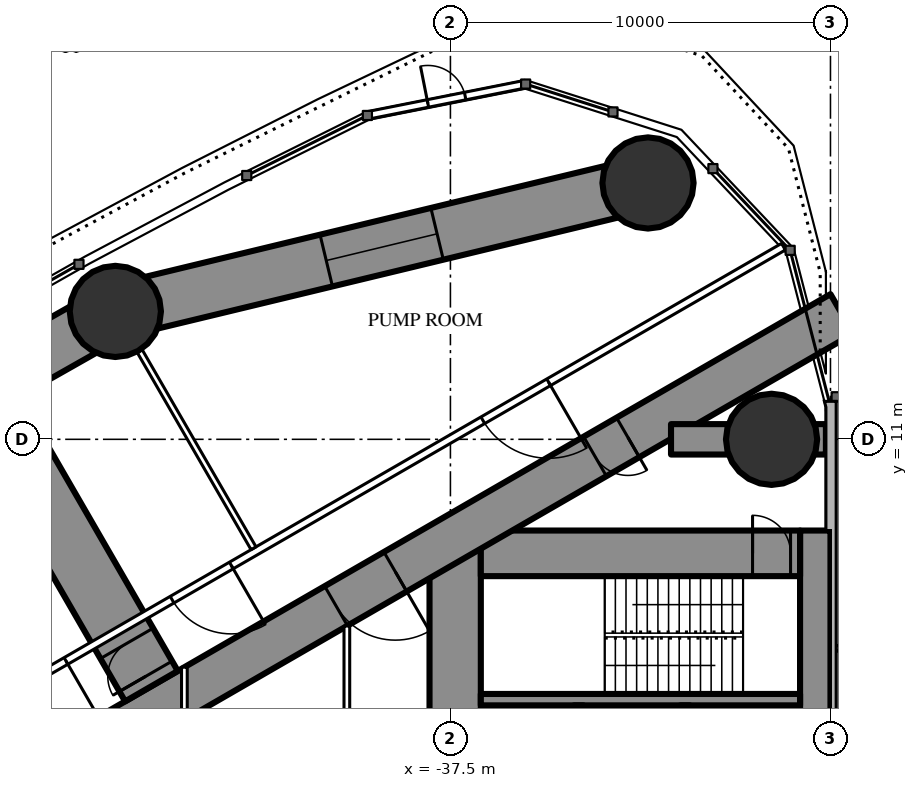
"""IFC4 building model, lengths in metres.
Left out: names, types, materials, properties, quantities, classifications, styles, units other than length and angle.
Written with IfcOpenShell. Run it as: python <this file> out.ifc"""

import sys

from ifc_helpers import new_model, si_unit, direction, frame, frame_2d, origin, origin_2d, place, context, subcontext, project, spatial, rectangle, circle, hollow_circle, extrude, element, fill, save


model = new_model("IFC4")
c1 = context("Model", 3, precision=1e-05, world=origin(), true_north=direction((0.0, 1.0)))
c2 = subcontext(c1, "Body", "Model", "MODEL_VIEW")
j1 = project(units=[si_unit("LENGTHUNIT", "METRE"), si_unit("PLANEANGLEUNIT", "RADIAN")], contexts=[c1])
p1 = place(None, origin())
s1 = spatial("IfcSite", under=j1, at=p1, CompositionType="ELEMENT")
p2 = place(p1, origin())
s2 = spatial("IfcBuilding", under=s1, at=p2, CompositionType="ELEMENT")
p3 = place(p2, frame((0.0, 0.0, 210.3)))
s3 = spatial("IfcBuildingStorey", under=s2, at=p3, CompositionType="ELEMENT", Elevation=210.3)
p4 = place(p3, frame((-32.301, 17.745, 0.0), z_axis=(0.0, 0.0, 1.0), x_axis=(1.0, 0.0, 0.0)))
e1 = element("IfcColumn", 1, at=p4, inside=s3, PredefinedType="COLUMN", context=c2, shape_type="SweptSolid", body=[
    extrude(circle(Radius=1.2, at=origin_2d()), origin(), (0.0, 0.0, 1.0), 5.0),
])
p5 = place(p3, frame((-29.05, 11.0, 0.0), z_axis=(0.0, 0.0, 1.0), x_axis=(1.0, 0.0, 0.0)))
e2 = element("IfcColumn", 2, at=p5, inside=s3, PredefinedType="COLUMN", context=c2, shape_type="SweptSolid", body=[
    extrude(hollow_circle(Radius=1.2, WallThickness=0.09, at=origin_2d()), origin(), (0.0, 0.0, 1.0), 5.0),
])
p6 = place(p3, frame((-46.317, 14.365, 0.0), z_axis=(0.0, 0.0, 1.0), x_axis=(1.0, 0.0, 0.0)))
e3 = element("IfcColumn", 3, at=p6, inside=s3, PredefinedType="COLUMN", context=c2, shape_type="SweptSolid", body=[
    extrude(circle(Radius=1.2, at=origin_2d()), origin(), (0.0, 0.0, 1.0), 5.0),
])
p7 = place(p3, frame((-27.9, 8.6, 0.0), z_axis=(0.0, 0.0, 1.0), x_axis=(0.0, -1.0, 0.0)))
e4 = element("IfcWall", 4, at=p7, inside=s3, PredefinedType="SHEAR", context=c2, shape_type="SweptSolid", body=[
    extrude(rectangle(XDim=17.2, YDim=0.8, at=frame_2d((8.6, 0.0))), origin(), (0.0, 0.0, 1.0), 5.0),
])
p8 = place(p7, frame((6.95, 0.0, 0.0)))
e5 = element("IfcOpeningElement", 5, at=p8, cuts=e4, PredefinedType="OPENING", context=c2, shape_type="SweptSolid", body=[
    extrude(rectangle(XDim=0.9, YDim=2.2, at=frame_2d((0.45, 1.1))), frame((0.0, 0.41, 0.0), z_axis=(0.0, -1.0, 0.0), x_axis=(1.0, 0.0, 0.0)), (0.0, 0.0, 1.0), 0.82),
])
p9 = place(p3, frame((-37.375, 8.6, 0.0), z_axis=(0.0, 0.0, 1.0), x_axis=(0.0, -1.0, 0.0)))
e6 = element("IfcWall", 6, at=p9, inside=s3, PredefinedType="SHEAR", context=c2, shape_type="SweptSolid", body=[
    extrude(rectangle(XDim=17.2, YDim=1.35, at=frame_2d((8.6, 0.0))), origin(), (0.0, 0.0, 1.0), 5.0),
])
p10 = place(p9, frame((7.7, 0.0, 0.0)))
e7 = element("IfcOpeningElement", 7, at=p10, cuts=e6, PredefinedType="OPENING", context=c2, shape_type="SweptSolid", body=[
    extrude(rectangle(XDim=1.8, YDim=2.2, at=frame_2d((0.9, 1.1))), frame((0.0, 0.685, 0.0), z_axis=(0.0, -1.0, 0.0), x_axis=(1.0, 0.0, 0.0)), (0.0, 0.0, 1.0), 1.37),
])
p11 = place(p3, frame((-28.3, 8.0, 0.0), z_axis=(0.0, 0.0, 1.0), x_axis=(-1.0, 0.0, 0.0)))
e8 = element("IfcWall", 8, at=p11, inside=s3, PredefinedType="SHEAR", context=c2, shape_type="SweptSolid", body=[
    extrude(rectangle(XDim=8.4, YDim=1.2, at=frame_2d((4.2, 0.0))), origin(), (0.0, 0.0, 1.0), 5.0),
])
p12 = place(p11, frame((0.25, 0.0, 0.0)))
e9 = element("IfcOpeningElement", 9, at=p12, cuts=e8, PredefinedType="OPENING", context=c2, shape_type="SweptSolid", body=[
    extrude(rectangle(XDim=1.0, YDim=2.2, at=frame_2d((0.5, 1.1))), frame((0.0, 0.61, 0.0), z_axis=(0.0, -1.0, 0.0), x_axis=(1.0, 0.0, 0.0)), (0.0, 0.0, 1.0), 1.22),
])
p13 = place(p3, frame((-28.3, 4.15, 0.0), z_axis=(0.0, 0.0, 1.0), x_axis=(-1.0, 0.0, 0.0)))
e10 = element("IfcWall", 10, at=p13, inside=s3, PredefinedType="SHEAR", context=c2, shape_type="SweptSolid", body=[
    extrude(rectangle(XDim=8.4, YDim=0.3, at=frame_2d((4.2, 0.0))), origin(), (0.0, 0.0, 1.0), 5.0),
])
p14 = place(p3, frame((-31.325, 4.0, 0.0), z_axis=(0.0, 0.0, 1.0), x_axis=(0.0, -1.0, 0.0)))
e11 = element("IfcWall", 11, at=p14, inside=s3, PredefinedType="SHEAR", context=c2, shape_type="SweptSolid", body=[
    extrude(rectangle(XDim=2.1, YDim=0.25, at=frame_2d((1.05, 0.0))), origin(), (0.0, 0.0, 1.0), 5.0),
])
p15 = place(p14, frame((0.5, 0.0, 0.0)))
e12 = element("IfcOpeningElement", 12, at=p15, cuts=e11, PredefinedType="OPENING", context=c2, shape_type="SweptSolid", body=[
    extrude(rectangle(XDim=1.1, YDim=2.2, at=frame_2d((0.55, 1.1))), frame((0.0, 0.135, 0.0), z_axis=(0.0, -1.0, 0.0), x_axis=(1.0, 0.0, 0.0)), (0.0, 0.0, 1.0), 0.27),
])
p16 = place(p3, frame((-34.125, 4.0, 0.0), z_axis=(0.0, 0.0, 1.0), x_axis=(0.0, -1.0, 0.0)))
e13 = element("IfcWall", 13, at=p16, inside=s3, PredefinedType="SHEAR", context=c2, shape_type="SweptSolid", body=[
    extrude(rectangle(XDim=2.35, YDim=0.25, at=frame_2d((1.175, 0.0))), origin(), (0.0, 0.0, 1.0), 5.0),
])
p17 = place(p3, frame((-27.2, 14.3, 0.0), z_axis=(0.0, 0.0, 1.0), x_axis=(-0.866026593062, -0.499997940104, 0.0)))
e14 = element("IfcWall", 14, at=p17, inside=s3, PredefinedType="SHEAR", context=c2, shape_type="SweptSolid", body=[
    extrude(rectangle(XDim=28.946, YDim=1.2, at=frame_2d((14.473, 0.0))), origin(), (0.0, 0.0, 1.0), 5.0),
])
p18 = place(p17, frame((6.5, 0.0, 0.0)))
e15 = element("IfcOpeningElement", 15, at=p18, cuts=e14, PredefinedType="OPENING", context=c2, shape_type="SweptSolid", body=[
    extrude(rectangle(XDim=1.0, YDim=2.2, at=frame_2d((0.5, 1.1))), frame((0.0, 0.61, 0.0), z_axis=(0.0, -1.0, 0.0), x_axis=(1.0, 0.0, 0.0)), (0.0, 0.0, 1.0), 1.22),
])
p19 = place(p17, frame((13.568, 0.0, 0.0)))
e16 = element("IfcOpeningElement", 16, at=p19, cuts=e14, PredefinedType="OPENING", context=c2, shape_type="SweptSolid", body=[
    extrude(rectangle(XDim=1.8, YDim=2.2, at=frame_2d((0.9, 1.1))), frame((0.0, 0.61, 0.0), z_axis=(0.0, -1.0, 0.0), x_axis=(1.0, 0.0, 0.0)), (0.0, 0.0, 1.0), 1.22),
])
p20 = place(p3, frame((-27.62, 11.0, 0.0), z_axis=(0.0, 0.0, 1.0), x_axis=(-1.0, 0.0, 0.0)))
e17 = element("IfcWall", 17, at=p20, inside=s3, PredefinedType="SHEAR", context=c2, shape_type="SweptSolid", body=[
    extrude(rectangle(XDim=4.076, YDim=0.8, at=frame_2d((2.038, 0.0))), origin(), (0.0, 0.0, 1.0), 5.0),
])
p21 = place(p3, frame((-45.366, 4.504, 0.0), z_axis=(0.0, 0.0, 1.0), x_axis=(-0.499998848701, 0.866026068486, 0.0)))
e18 = element("IfcWall", 18, at=p21, inside=s3, PredefinedType="SHEAR", context=c2, shape_type="SweptSolid", body=[
    extrude(rectangle(XDim=9.048, YDim=1.6, at=frame_2d((4.524, 0.0))), origin(), (0.0, 0.0, 1.0), 5.0),
])
p22 = place(p21, frame((0.3, 0.0, 0.0)))
e19 = element("IfcOpeningElement", 19, at=p22, cuts=e18, PredefinedType="OPENING", context=c2, shape_type="SweptSolid", body=[
    extrude(rectangle(XDim=1.0, YDim=2.2, at=frame_2d((0.5, 1.1))), frame((0.0, 0.81, 0.0), z_axis=(0.0, -1.0, 0.0), x_axis=(1.0, 0.0, 0.0)), (0.0, 0.0, 1.0), 1.62),
])
p23 = place(p3, frame((-32.301, 17.745, 0.0), z_axis=(0.0, 0.0, 1.0), x_axis=(-0.972132796948, -0.234430853556, 0.0)))
e20 = element("IfcWall", 20, at=p23, inside=s3, PredefinedType="SHEAR", context=c2, shape_type="SweptSolid", body=[
    extrude(rectangle(XDim=14.417, YDim=1.4, at=frame_2d((7.209, 0.0))), origin(), (0.0, 0.0, 1.0), 5.0),
])
p24 = place(p23, frame((5.709, 0.0, 0.6)))
e21 = element("IfcOpeningElement", 21, at=p24, cuts=e20, PredefinedType="OPENING", context=c2, shape_type="SweptSolid", body=[
    extrude(rectangle(XDim=3.0, YDim=1.2, at=frame_2d((1.5, 0.6))), frame((0.0, 0.71, 0.0), z_axis=(0.0, -1.0, 0.0), x_axis=(1.0, 0.0, 0.0)), (0.0, 0.0, 1.0), 1.42),
])
p25 = place(p3, frame((-46.317, 14.365, 0.0), z_axis=(0.0, 0.0, 1.0), x_axis=(-0.869978841992, -0.493089053301, 0.0)))
e22 = element("IfcWall", 22, at=p25, inside=s3, PredefinedType="SHEAR", context=c2, shape_type="SweptSolid", body=[
    extrude(rectangle(XDim=4.108, YDim=1.4, at=frame_2d((2.054, 0.0))), origin(), (0.0, 0.0, 1.0), 5.0),
])
p26 = place(p3, frame((-39.685, 19.521, 0.0), z_axis=(0.0, 0.0, 1.0), x_axis=(0.980858378754, 0.194722471298, 0.0)))
e23 = element("IfcWall", 23, at=p26, inside=s3, PredefinedType="STANDARD", context=c2, shape_type="SweptSolid", body=[
    extrude(rectangle(XDim=4.245, YDim=0.2, at=frame_2d((2.123, 0.0))), origin(), (0.0, 0.0, 1.0), 4.75),
])
p27 = place(p26, frame((1.623, 0.0, 0.0)))
e24 = element("IfcOpeningElement", 24, at=p27, cuts=e23, PredefinedType="OPENING", context=c2, shape_type="SweptSolid", body=[
    extrude(rectangle(XDim=1.0, YDim=2.2, at=frame_2d((0.5, 1.1))), frame((0.0, 0.11, 0.0), z_axis=(0.0, -1.0, 0.0), x_axis=(1.0, 0.0, 0.0)), (0.0, 0.0, 1.0), 0.22),
])
p28 = place(p3, frame((-28.737, 16.068, 0.0), z_axis=(0.0, 0.0, 1.0), x_axis=(-0.866026057212, -0.499998868229, 0.0)))
e25 = element("IfcWall", 25, at=p28, inside=s3, PredefinedType="PARTITIONING", context=c2, shape_type="SweptSolid", body=[
    extrude(rectangle(XDim=32.137, YDim=0.2, at=frame_2d((16.068, 0.0))), origin(), (0.0, 0.0, 1.0), 4.75),
])
p29 = place(p28, frame((7.134, 0.0, 0.0)))
e26 = element("IfcOpeningElement", 26, at=p29, cuts=e25, PredefinedType="OPENING", context=c2, shape_type="SweptSolid", body=[
    extrude(rectangle(XDim=2.0, YDim=2.4, at=frame_2d((1.0, 1.2))), frame((0.0, 0.11, 0.0), z_axis=(0.0, -1.0, 0.0), x_axis=(1.0, 0.0, 0.0)), (0.0, 0.0, 1.0), 0.22),
])
p30 = place(p28, frame((16.776, 0.0, 0.0)))
e27 = element("IfcOpeningElement", 27, at=p30, cuts=e25, PredefinedType="OPENING", context=c2, shape_type="SweptSolid", body=[
    extrude(rectangle(XDim=1.8, YDim=2.2, at=frame_2d((0.9, 1.1))), frame((0.0, 0.11, 0.0), z_axis=(0.0, -1.0, 0.0), x_axis=(1.0, 0.0, 0.0)), (0.0, 0.0, 1.0), 0.22),
])
p31 = place(p28, frame((21.799, 0.0, 0.0)))
e28 = element("IfcOpeningElement", 28, at=p31, cuts=e25, PredefinedType="OPENING", context=c2, shape_type="SweptSolid", body=[
    extrude(rectangle(XDim=1.8, YDim=2.2, at=frame_2d((0.9, 1.1))), frame((0.0, 0.11, 0.0), z_axis=(0.0, -1.0, 0.0), x_axis=(1.0, 0.0, 0.0)), (0.0, 0.0, 1.0), 0.22),
])
p32 = place(p28, frame((26.575, 0.0, 0.0)))
e29 = element("IfcOpeningElement", 29, at=p32, cuts=e25, PredefinedType="OPENING", context=c2, shape_type="SweptSolid", body=[
    extrude(rectangle(XDim=1.8, YDim=2.2, at=frame_2d((0.9, 1.1))), frame((0.0, 0.11, 0.0), z_axis=(0.0, -1.0, 0.0), x_axis=(1.0, 0.0, 0.0)), (0.0, 0.0, 1.0), 0.22),
])
p33 = place(p3, frame((-42.68, 8.134, 0.0), z_axis=(0.0, 0.0, 1.0), x_axis=(-0.499984479505, 0.866034364361, 0.0)))
e30 = element("IfcWall", 30, at=p33, inside=s3, PredefinedType="PARTITIONING", context=c2, shape_type="SweptSolid", body=[
    extrude(rectangle(XDim=5.995, YDim=0.15, at=frame_2d((2.998, 0.0))), origin(), (0.0, 0.0, 1.0), 3.85),
])
p34 = place(p3, frame((-40.225, 6.087, 0.0), z_axis=(0.0, 0.0, 1.0), x_axis=(0.0, -1.0, 0.0)))
e31 = element("IfcWall", 31, at=p34, inside=s3, PredefinedType="PARTITIONING", context=c2, shape_type="SweptSolid", body=[
    extrude(rectangle(XDim=12.174, YDim=0.15, at=frame_2d((6.087, 0.0))), origin(), (0.0, 0.0, 1.0), 4.75),
])
p35 = place(p34, frame((5.187, 0.0, 0.0)))
e32 = element("IfcOpeningElement", 32, at=p35, cuts=e31, PredefinedType="OPENING", context=c2, shape_type="SweptSolid", body=[
    extrude(rectangle(XDim=1.8, YDim=2.2, at=frame_2d((0.9, 1.1))), frame((0.0, 0.085, 0.0), z_axis=(0.0, -1.0, 0.0), x_axis=(1.0, 0.0, 0.0)), (0.0, 0.0, 1.0), 0.17),
])
p36 = place(p3, frame((-44.5, 5.005, 0.0), z_axis=(0.0, 0.0, 1.0), x_axis=(0.0, -1.0, 0.0)))
e33 = element("IfcWall", 33, at=p36, inside=s3, PredefinedType="PARTITIONING", context=c2, shape_type="SweptSolid", body=[
    extrude(rectangle(XDim=10.009, YDim=0.15, at=frame_2d((5.005, 0.0))), origin(), (0.0, 0.0, 1.0), 4.75),
])
p37 = place(p36, frame((4.505, 0.0, 0.0)))
e34 = element("IfcOpeningElement", 34, at=p37, cuts=e33, PredefinedType="OPENING", context=c2, shape_type="SweptSolid", body=[
    extrude(rectangle(XDim=1.0, YDim=2.2, at=frame_2d((0.5, 1.1))), frame((0.0, 0.085, 0.0), z_axis=(0.0, -1.0, 0.0), x_axis=(1.0, 0.0, 0.0)), (0.0, 0.0, 1.0), 0.17),
])
p38 = place(p3, frame((-27.35, 5.5, 0.0), z_axis=(0.0, 0.0, 1.0), x_axis=(1.0, 0.0, 0.0)))
e35 = element("IfcWall", 35, at=p38, inside=s3, PredefinedType="PARTITIONING", context=c2, shape_type="SweptSolid", body=[
    extrude(rectangle(XDim=0.85, YDim=0.15, at=frame_2d((0.425, 0.0))), origin(), (0.0, 0.0, 1.0), 3.8),
])
p39 = place(p24, origin())
e36 = element("IfcWindow", 36, at=p39, inside=s3, PartitioningType="SINGLE_PANEL", PredefinedType="WINDOW", context=c2, shape_type="SweptSolid", body=[
    extrude(rectangle(XDim=3.0, YDim=1.2, at=frame_2d((1.5, 0.6))), frame((0.0, 0.03, 0.0), z_axis=(0.0, -1.0, 0.0), x_axis=(1.0, 0.0, 0.0)), (0.0, 0.0, 1.0), 0.06),
])
fill(e21, e36)
p40 = place(p27, origin())
e37 = element("IfcDoor", 37, at=p40, inside=s3, OperationType="SINGLE_SWING_LEFT", PredefinedType="DOOR", context=c2, shape_type="SweptSolid", body=[
    extrude(rectangle(XDim=1.0, YDim=2.2, at=frame_2d((0.5, 1.1))), frame((0.0, 0.025, 0.0), z_axis=(0.0, -1.0, 0.0), x_axis=(1.0, 0.0, 0.0)), (0.0, 0.0, 1.0), 0.05),
])
fill(e24, e37)
p41 = place(p22, origin())
e38 = element("IfcDoor", 38, at=p41, inside=s3, OperationType="SINGLE_SWING_LEFT", PredefinedType="DOOR", context=c2, shape_type="SweptSolid", body=[
    extrude(rectangle(XDim=1.0, YDim=2.2, at=frame_2d((0.5, 1.1))), frame((0.0, 0.025, 0.0), z_axis=(0.0, -1.0, 0.0), x_axis=(1.0, 0.0, 0.0)), (0.0, 0.0, 1.0), 0.05),
])
fill(e19, e38)
p42 = place(p29, origin())
e39 = element("IfcDoor", 39, at=p42, inside=s3, OperationType="DOUBLE_DOOR_SINGLE_SWING", PredefinedType="DOOR", context=c2, shape_type="SweptSolid", body=[
    extrude(rectangle(XDim=2.0, YDim=2.4, at=frame_2d((1.0, 1.2))), frame((0.0, 0.025, 0.0), z_axis=(0.0, -1.0, 0.0), x_axis=(1.0, 0.0, 0.0)), (0.0, 0.0, 1.0), 0.05),
])
fill(e26, e39)
p43 = place(p30, origin())
e40 = element("IfcDoor", 40, at=p43, inside=s3, OperationType="DOUBLE_DOOR_SINGLE_SWING", PredefinedType="DOOR", context=c2, shape_type="SweptSolid", body=[
    extrude(rectangle(XDim=1.8, YDim=2.2, at=frame_2d((0.9, 1.1))), frame((0.0, 0.025, 0.0), z_axis=(0.0, -1.0, 0.0), x_axis=(1.0, 0.0, 0.0)), (0.0, 0.0, 1.0), 0.05),
])
fill(e27, e40)
p44 = place(p31, origin())
e41 = element("IfcDoor", 41, at=p44, inside=s3, OperationType="DOUBLE_DOOR_SINGLE_SWING", PredefinedType="DOOR", context=c2, shape_type="SweptSolid", body=[
    extrude(rectangle(XDim=1.8, YDim=2.2, at=frame_2d((0.9, 1.1))), frame((0.0, 0.025, 0.0), z_axis=(0.0, -1.0, 0.0), x_axis=(1.0, 0.0, 0.0)), (0.0, 0.0, 1.0), 0.05),
])
fill(e28, e41)
p45 = place(p18, origin())
e42 = element("IfcDoor", 42, at=p45, inside=s3, OperationType="SINGLE_SWING_LEFT", PredefinedType="DOOR", context=c2, shape_type="SweptSolid", body=[
    extrude(rectangle(XDim=1.0, YDim=2.2, at=frame_2d((0.5, 1.1))), frame((0.0, 0.025, 0.0), z_axis=(0.0, -1.0, 0.0), x_axis=(1.0, 0.0, 0.0)), (0.0, 0.0, 1.0), 0.05),
])
fill(e15, e42)
p46 = place(p19, origin())
e43 = element("IfcDoor", 43, at=p46, inside=s3, OperationType="DOUBLE_DOOR_SINGLE_SWING", PredefinedType="DOOR", context=c2, shape_type="SweptSolid", body=[
    extrude(rectangle(XDim=1.8, YDim=2.2, at=frame_2d((0.9, 1.1))), frame((0.0, 0.025, 0.0), z_axis=(0.0, -1.0, 0.0), x_axis=(1.0, 0.0, 0.0)), (0.0, 0.0, 1.0), 0.05),
])
fill(e16, e43)
p47 = place(p12, origin())
e44 = element("IfcDoor", 44, at=p47, inside=s3, OperationType="SINGLE_SWING_RIGHT", PredefinedType="DOOR", context=c2, shape_type="SweptSolid", body=[
    extrude(rectangle(XDim=1.0, YDim=2.2, at=frame_2d((0.5, 1.1))), frame((0.0, 0.025, 0.0), z_axis=(0.0, -1.0, 0.0), x_axis=(1.0, 0.0, 0.0)), (0.0, 0.0, 1.0), 0.05),
])
fill(e9, e44)
save(model, sys.argv[1])
